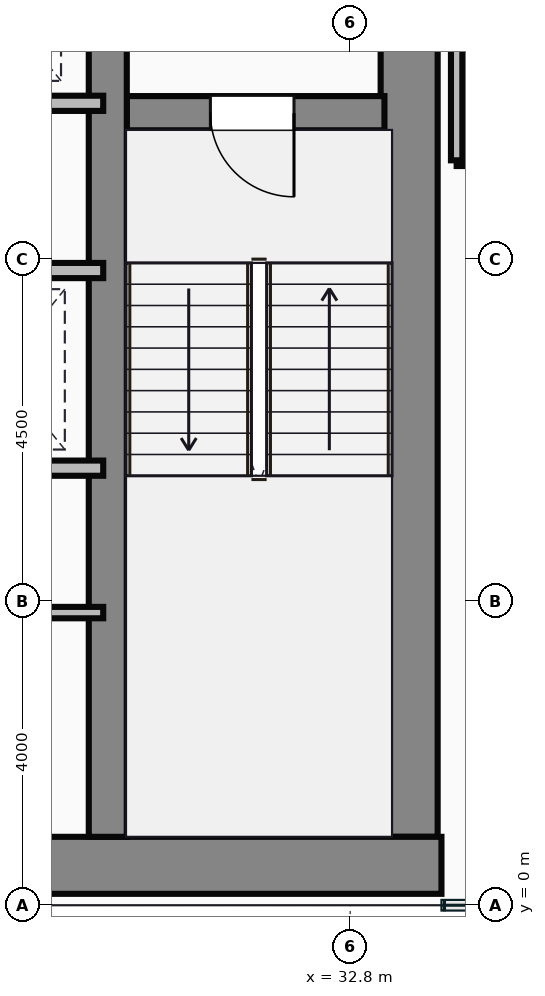
"""IFC4 building model, lengths in metres.
Left out: names, types, materials, properties, quantities, classifications, styles, units other than length and angle.
Written with IfcOpenShell. Run it as: python <this file> out.ifc"""

import sys

from ifc_helpers import new_model, si_unit, direction, frame, frame_2d, origin, place, context, subcontext, project, spatial, rectangle, extrude, source, transform, mapped, element, fill, save


model = new_model("IFC4")
c1 = context("Model", 3, precision=1e-05, world=origin(), true_north=direction((0.0, 1.0)))
c2 = subcontext(c1, "Body", "Model", "MODEL_VIEW")
j1 = project(units=[si_unit("LENGTHUNIT", "METRE"), si_unit("PLANEANGLEUNIT", "RADIAN")], contexts=[c1])
p1 = place(None, origin())
s1 = spatial("IfcSite", under=j1, at=p1, CompositionType="ELEMENT")
p2 = place(p1, origin())
s2 = spatial("IfcBuilding", under=s1, at=p2, CompositionType="ELEMENT")
p3 = place(p2, frame((0.0, 0.0, 158.85)))
s3 = spatial("IfcBuildingStorey", under=s2, at=p3, CompositionType="ELEMENT", Elevation=158.85)
m1 = source(origin(), c2, "Body", "SweptSolid", [
    extrude(rectangle(XDim=29.5, YDim=0.75, at=frame_2d((14.75, 0.0))), origin(), (0.0, 0.0, 1.0), 3.65),
])
p4 = place(p3, frame((4.5, 0.525, 0.0), z_axis=(0.0, 0.0, 1.0), x_axis=(1.0, 0.0, 0.0)))
e1 = element("IfcWall", 1, at=p4, inside=s3, PredefinedType="SHEAR", context=c2, shape_type="MappedRepresentation", body=[
    mapped(m1, transform((0.0, 0.0, 0.0))),
])
m2 = source(origin(), c2, "Body", "SweptSolid", [
    extrude(rectangle(XDim=13.1, YDim=0.75, at=frame_2d((6.55, 0.0))), origin(), (0.0, 0.0, 1.0), 3.65),
])
p5 = place(p3, frame((33.575, 0.9, 0.0), z_axis=(0.0, 0.0, 1.0), x_axis=(0.0, 1.0, 0.0)))
e2 = element("IfcWall", 2, at=p5, inside=s3, PredefinedType="SHEAR", context=c2, shape_type="MappedRepresentation", body=[
    mapped(m2, transform((0.0, 0.0, 0.0))),
])
m3 = source(origin(), c2, "Body", "SweptSolid", [
    extrude(rectangle(XDim=12.35, YDim=0.5, at=frame_2d((6.175, 0.0))), origin(), (0.0, 0.0, 1.0), 3.65),
])
p6 = place(p3, frame((29.61, 0.9, 0.0), z_axis=(0.0, 0.0, 1.0), x_axis=(0.0, 1.0, 0.0)))
e3 = element("IfcWall", 3, at=p6, inside=s3, PredefinedType="SHEAR", context=c2, shape_type="MappedRepresentation", body=[
    mapped(m3, transform((0.0, 0.0, 0.0))),
])
m4 = source(origin(), c2, "Body", "SweptSolid", [
    extrude(rectangle(XDim=3.39, YDim=0.45, at=frame_2d((1.695, 0.0))), origin(), (0.0, 0.0, 1.0), 3.65),
])
p7 = place(p3, frame((29.86, 10.42, 0.0), z_axis=(0.0, 0.0, 1.0), x_axis=(1.0, 0.0, 0.0)))
e4 = element("IfcWall", 4, at=p7, inside=s3, PredefinedType="SHEAR", context=c2, shape_type="MappedRepresentation", body=[
    mapped(m4, transform((0.0, 0.0, 0.0))),
])
p8 = place(p7, frame((1.1, 0.0, 0.0)))
e5 = element("IfcOpeningElement", 5, at=p8, cuts=e4, PredefinedType="OPENING", context=c2, shape_type="SweptSolid", body=[
    extrude(rectangle(XDim=1.1, YDim=2.15, at=frame_2d((0.55, 1.075))), frame((0.0, 0.235, 0.0), z_axis=(0.0, -1.0, 0.0), x_axis=(1.0, 0.0, 0.0)), (0.0, 0.0, 1.0), 0.47),
])
m5 = source(origin(), c2, "Body", "SweptSolid", [
    extrude(rectangle(XDim=8.8, YDim=0.2, at=frame_2d((4.4, 0.0))), origin(), (0.0, 0.0, 1.0), 3.4),
])
p9 = place(p3, frame((20.75, 10.55, 0.0), z_axis=(0.0, 0.0, 1.0), x_axis=(1.0, 0.0, 0.0)))
e6 = element("IfcWall", 6, at=p9, inside=s3, PredefinedType="PARTITIONING", context=c2, shape_type="MappedRepresentation", body=[
    mapped(m5, transform((0.0, 0.0, 0.0))),
])
m6 = source(origin(), c2, "Body", "SweptSolid", [
    extrude(rectangle(XDim=4.55, YDim=0.2, at=frame_2d((2.275, 0.0))), origin(), (0.0, 0.0, 1.0), 3.4),
])
for number, where, z_axis, x_axis in (
    (7, (25.0, 8.35, 0.0), (0.0, 0.0, 1.0), (1.0, 0.0, 0.0)),
    (8, (25.0, 5.75, 0.0), (0.0, 0.0, 1.0), (1.0, 0.0, 0.0)),
):
    element("IfcWall", number, at=place(p3, frame(where, z_axis=z_axis, x_axis=x_axis)), inside=s3, PredefinedType="PARTITIONING", context=c2, shape_type="MappedRepresentation", body=[
        mapped(m6, transform((0.0, 0.0, 0.0))),
    ])
m7 = source(origin(), c2, "Body", "SweptSolid", [
    extrude(rectangle(XDim=4.55, YDim=0.15, at=frame_2d((2.275, 0.0))), origin(), (0.0, 0.0, 1.0), 3.4),
])
p10 = place(p3, frame((25.0, 3.85, 0.0), z_axis=(0.0, 0.0, 1.0), x_axis=(1.0, 0.0, 0.0)))
e9 = element("IfcWall", 9, at=p10, inside=s3, PredefinedType="PARTITIONING", context=c2, shape_type="MappedRepresentation", body=[
    mapped(m7, transform((0.0, 0.0, 0.0))),
])
m8 = source(origin(), c2, "Body", "SweptSolid", [
    extrude(rectangle(XDim=4.8, YDim=0.15, at=frame_2d((2.4, 0.0))), origin(), (0.0, 0.0, 1.0), 3.4),
])
p11 = place(p3, frame((34.2, 9.8, 0.0), z_axis=(0.0, 0.0, 1.0), x_axis=(1.0, 0.0, 0.0)))
e10 = element("IfcWall", 10, at=p11, inside=s3, PredefinedType="PARTITIONING", context=c2, shape_type="MappedRepresentation", body=[
    mapped(m8, transform((0.0, 0.0, 0.0))),
])
m9 = source(origin(), c2, "Body", "SweptSolid", [
    extrude(rectangle(XDim=4.18, YDim=0.15, at=frame_2d((2.09, 0.0))), origin(), (0.0, 0.0, 1.0), 3.4),
])
p12 = place(p3, frame((34.2, 9.8, 0.0), z_axis=(0.0, 0.0, 1.0), x_axis=(0.0, 1.0, 0.0)))
e11 = element("IfcWall", 11, at=p12, inside=s3, PredefinedType="PARTITIONING", context=c2, shape_type="MappedRepresentation", body=[
    mapped(m9, transform((0.0, 0.0, 0.0))),
])
m10 = source(origin(), c2, "Body", "SweptSolid", [
    extrude(rectangle(XDim=1.1, YDim=2.15, at=frame_2d((0.55, 1.075))), frame((0.0, 0.025, 0.0), z_axis=(0.0, -1.0, 0.0), x_axis=(1.0, 0.0, 0.0)), (0.0, 0.0, 1.0), 0.05),
])
p13 = place(p8, frame((1.1, 0.0, 0.0), z_axis=(0.0, 0.0, 1.0), x_axis=(-1.0, 0.0, 0.0)))
e12 = element("IfcDoor", 12, at=p13, inside=s3, OperationType="SINGLE_SWING_RIGHT", PredefinedType="DOOR", context=c2, shape_type="MappedRepresentation", body=[
    mapped(m10, transform((0.0, 0.0, 0.0))),
])
fill(e5, e12)
save(model, sys.argv[1])
